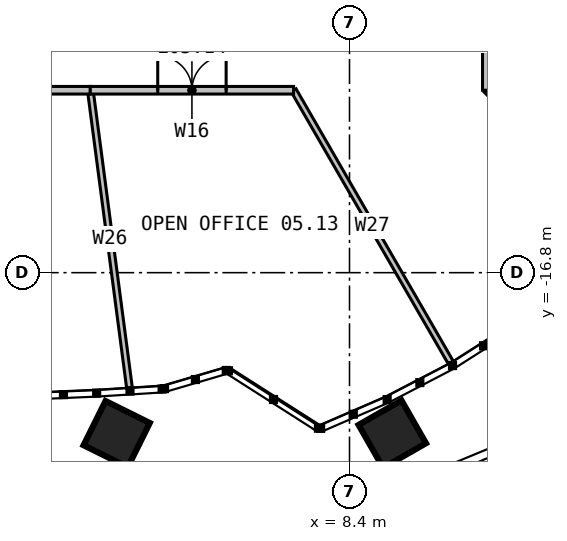
"""IFC4 building model, lengths in metres.
Left out: names, types, materials, properties, quantities, classifications, styles, units other than length and angle.
Written with IfcOpenShell. Run it as: python <this file> out.ifc"""

import sys

from ifc_helpers import new_model, si_unit, direction, frame, frame_2d, origin, place, context, subcontext, project, spatial, rectangle, extrude, element, fill, save


model = new_model("IFC4")
c1 = context("Model", 3, precision=1e-05, world=origin(), true_north=direction((0.0, 1.0)))
c2 = subcontext(c1, "Body", "Model", "MODEL_VIEW")
j1 = project(units=[si_unit("LENGTHUNIT", "METRE"), si_unit("PLANEANGLEUNIT", "RADIAN")], contexts=[c1])
p1 = place(None, origin())
s1 = spatial("IfcSite", under=j1, at=p1, CompositionType="ELEMENT")
p2 = place(p1, origin())
s2 = spatial("IfcBuilding", under=s1, at=p2, CompositionType="ELEMENT")
p3 = place(p2, frame((0.0, 0.0, 25.0)))
s3 = spatial("IfcBuildingStorey", under=s2, at=p3, CompositionType="ELEMENT", Elevation=25.0)
p4 = place(p3, frame((1.58, -12.0, 0.0), z_axis=(0.0, 0.0, 1.0), x_axis=(0.130512127361, -0.991446712946, 0.0)))
e1 = element("IfcWall", 1, at=p4, inside=s3, PredefinedType="PARTITIONING", context=c2, shape_type="SweptSolid", body=[
    extrude(rectangle(XDim=7.892, YDim=0.15, at=frame_2d((3.946, 0.0))), origin(), (0.0, 0.0, 1.0), 2.79),
])
p5 = place(p3, frame((6.928, -12.0, 0.0), z_axis=(0.0, 0.0, 1.0), x_axis=(0.499988970207, -0.866031771745, 0.0)))
e2 = element("IfcWall", 2, at=p5, inside=s3, PredefinedType="PARTITIONING", context=c2, shape_type="SweptSolid", body=[
    extrude(rectangle(XDim=8.273, YDim=0.15, at=frame_2d((4.137, 0.0))), origin(), (0.0, 0.0, 1.0), 2.79),
])
p6 = place(p3, frame((12.0, -12.0, 0.0), z_axis=(0.0, 0.0, 1.0), x_axis=(0.707106781187, -0.707106781187, 0.0)))
e3 = element("IfcWall", 3, at=p6, inside=s3, PredefinedType="PARTITIONING", context=c2, shape_type="SweptSolid", body=[
    extrude(rectangle(XDim=2.985, YDim=0.15, at=frame_2d((1.492, 0.0))), origin(), (0.0, 0.0, 1.0), 2.79),
])
p7 = place(p3, frame((-6.928, -12.0, 0.0), z_axis=(0.0, 0.0, 1.0), x_axis=(1.0, 0.0, 0.0)))
e4 = element("IfcWall", 4, at=p7, inside=s3, PredefinedType="PARTITIONING", context=c2, shape_type="SweptSolid", body=[
    extrude(rectangle(XDim=8.508, YDim=0.2, at=frame_2d((4.254, 0.0))), origin(), (0.0, 0.0, 1.0), 3.8),
])
p8 = place(p7, frame((3.754, 0.0, 0.0)))
e5 = element("IfcOpeningElement", 5, at=p8, cuts=e4, PredefinedType="OPENING", context=c2, shape_type="SweptSolid", body=[
    extrude(rectangle(XDim=1.0, YDim=2.2, at=frame_2d((0.5, 1.1))), frame((0.0, 0.11, 0.0), z_axis=(0.0, -1.0, 0.0), x_axis=(1.0, 0.0, 0.0)), (0.0, 0.0, 1.0), 0.22),
])
p9 = place(p3, frame((1.58, -12.0, 0.0), z_axis=(0.0, 0.0, 1.0), x_axis=(1.0, 0.0, 0.0)))
e6 = element("IfcWall", 6, at=p9, inside=s3, PredefinedType="PARTITIONING", context=c2, shape_type="SweptSolid", body=[
    extrude(rectangle(XDim=5.348, YDim=0.2, at=frame_2d((2.674, 0.0))), origin(), (0.0, 0.0, 1.0), 3.8),
])
p10 = place(p9, frame((1.774, 0.0, 0.0)))
e7 = element("IfcOpeningElement", 7, at=p10, cuts=e6, PredefinedType="OPENING", context=c2, shape_type="SweptSolid", body=[
    extrude(rectangle(XDim=1.8, YDim=2.2, at=frame_2d((0.9, 1.1))), frame((0.0, 0.11, 0.0), z_axis=(0.0, -1.0, 0.0), x_axis=(1.0, 0.0, 0.0)), (0.0, 0.0, 1.0), 0.22),
])
p11 = place(p3, frame((12.0, -12.0, 0.0), z_axis=(0.0, 0.0, 1.0), x_axis=(0.0, 1.0, 0.0)))
e8 = element("IfcWall", 8, at=p11, inside=s3, PredefinedType="PARTITIONING", context=c2, shape_type="SweptSolid", body=[
    extrude(rectangle(XDim=5.072, YDim=0.2, at=frame_2d((2.536, 0.0))), origin(), (0.0, 0.0, 1.0), 3.8),
])
p12 = place(p11, frame((2.036, 0.0, 0.0)))
e9 = element("IfcOpeningElement", 9, at=p12, cuts=e8, PredefinedType="OPENING", context=c2, shape_type="SweptSolid", body=[
    extrude(rectangle(XDim=1.0, YDim=2.2, at=frame_2d((0.5, 1.1))), frame((0.0, 0.11, 0.0), z_axis=(0.0, -1.0, 0.0), x_axis=(1.0, 0.0, 0.0)), (0.0, 0.0, 1.0), 0.22),
])
p13 = place(p10, origin())
e10 = element("IfcDoor", 10, at=p13, inside=s3, OperationType="DOUBLE_DOOR_SINGLE_SWING", PredefinedType="DOOR", context=c2, shape_type="SweptSolid", body=[
    extrude(rectangle(XDim=1.8, YDim=2.2, at=frame_2d((0.9, 1.1))), frame((0.0, 0.025, 0.0), z_axis=(0.0, -1.0, 0.0), x_axis=(1.0, 0.0, 0.0)), (0.0, 0.0, 1.0), 0.05),
])
fill(e7, e10)
save(model, sys.argv[1])
